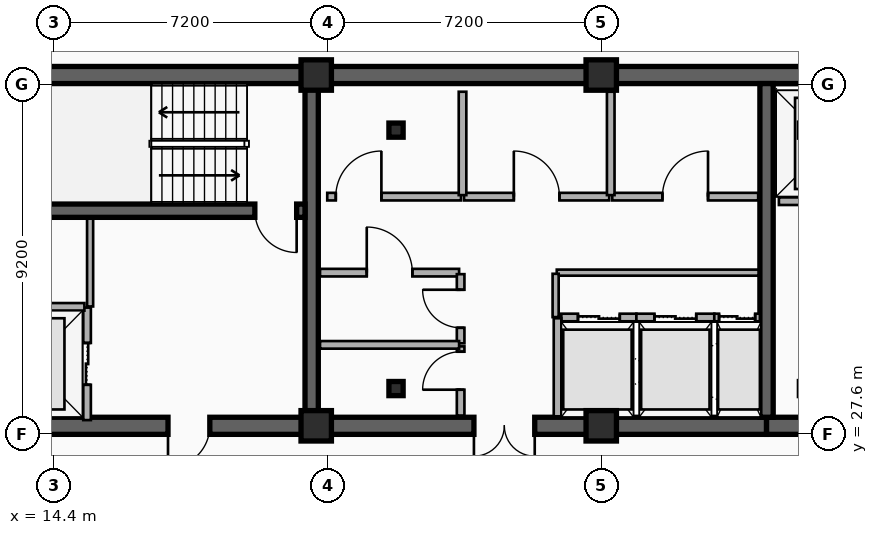
"""IFC4 building model, lengths in metres.
Left out: names, types, materials, properties, quantities, classifications, styles, units other than length and angle.
Written with IfcOpenShell. Run it as: python <this file> out.ifc"""

import sys

from ifc_helpers import new_model, si_unit, direction, frame, frame_2d, origin, origin_2d, place, context, subcontext, project, spatial, rectangle, i_section, extrude, element, fill, save


model = new_model("IFC4")
c1 = context("Model", 3, precision=1e-05, world=origin(), true_north=direction((0.0, 1.0)))
c2 = subcontext(c1, "Body", "Model", "MODEL_VIEW")
j1 = project(units=[si_unit("LENGTHUNIT", "METRE"), si_unit("PLANEANGLEUNIT", "RADIAN")], contexts=[c1])
p1 = place(None, origin())
s1 = spatial("IfcSite", under=j1, at=p1, CompositionType="ELEMENT")
p2 = place(p1, origin())
s2 = spatial("IfcBuilding", under=s1, at=p2, CompositionType="ELEMENT")
p3 = place(p2, frame((0.0, 0.0, 265.8)))
s3 = spatial("IfcBuildingStorey", under=s2, at=p3, CompositionType="ELEMENT", Elevation=265.8)
p4 = place(p3, frame((12.15, 37.05, 0.0), z_axis=(0.0, 0.0, 1.0), x_axis=(1.0, 0.0, 0.0)))
e1 = element("IfcWall", 1, at=p4, inside=s3, PredefinedType="SHEAR", context=c2, shape_type="SweptSolid", body=[
    extrude(rectangle(XDim=33.23, YDim=0.45, at=frame_2d((16.615, 0.0))), origin(), (0.0, 0.0, 1.0), 3.7),
])
p5 = place(p3, frame((21.18, 27.82, 0.0), z_axis=(0.0, 0.0, 1.0), x_axis=(-1.0, 0.0, 0.0)))
e2 = element("IfcWall", 2, at=p5, inside=s3, PredefinedType="SHEAR", context=c2, shape_type="SweptSolid", body=[
    extrude(rectangle(XDim=9.03, YDim=0.45, at=frame_2d((4.515, 0.0))), origin(), (0.0, 0.0, 1.0), 3.7),
])
p6 = place(p5, frame((2.68, 0.0, 0.0)))
e3 = element("IfcOpeningElement", 3, at=p6, cuts=e2, PredefinedType="OPENING", context=c2, shape_type="SweptSolid", body=[
    extrude(rectangle(XDim=1.1, YDim=2.15, at=frame_2d((0.55, 1.075))), frame((0.0, 0.235, 0.0), z_axis=(0.0, -1.0, 0.0), x_axis=(1.0, 0.0, 0.0)), (0.0, 0.0, 1.0), 0.47),
])
p7 = place(p3, frame((33.15, 27.82, 0.0), z_axis=(0.0, 0.0, 1.0), x_axis=(-1.0, 0.0, 0.0)))
e4 = element("IfcWall", 4, at=p7, inside=s3, PredefinedType="SHEAR", context=c2, shape_type="SweptSolid", body=[
    extrude(rectangle(XDim=11.97, YDim=0.45, at=frame_2d((5.985, 0.0))), origin(), (0.0, 0.0, 1.0), 3.7),
])
p8 = place(p7, frame((6.1, 0.0, 0.0)))
e5 = element("IfcOpeningElement", 5, at=p8, cuts=e4, PredefinedType="OPENING", context=c2, shape_type="SweptSolid", body=[
    extrude(rectangle(XDim=1.6, YDim=2.2, at=frame_2d((0.8, 1.1))), frame((0.0, 0.235, 0.0), z_axis=(0.0, -1.0, 0.0), x_axis=(1.0, 0.0, 0.0)), (0.0, 0.0, 1.0), 0.47),
])
p9 = place(p3, frame((45.38, 27.82, 0.0), z_axis=(0.0, 0.0, 1.0), x_axis=(-1.0, 0.0, 0.0)))
e6 = element("IfcWall", 6, at=p9, inside=s3, PredefinedType="SHEAR", context=c2, shape_type="SweptSolid", body=[
    extrude(rectangle(XDim=12.23, YDim=0.45, at=frame_2d((6.115, 0.0))), origin(), (0.0, 0.0, 1.0), 3.7),
])
p10 = place(p9, frame((9.93, 0.0, 0.0)))
e7 = element("IfcOpeningElement", 7, at=p10, cuts=e6, PredefinedType="OPENING", context=c2, shape_type="SweptSolid", body=[
    extrude(rectangle(XDim=1.1, YDim=2.15, at=frame_2d((0.55, 1.075))), frame((0.0, 0.235, 0.0), z_axis=(0.0, -1.0, 0.0), x_axis=(1.0, 0.0, 0.0)), (0.0, 0.0, 1.0), 0.47),
])
p11 = place(p9, frame((6.23, 0.0, 0.0)))
e8 = element("IfcOpeningElement", 8, at=p11, cuts=e6, PredefinedType="OPENING", context=c2, shape_type="SweptSolid", body=[
    extrude(rectangle(XDim=1.1, YDim=2.15, at=frame_2d((0.55, 1.075))), frame((0.0, 0.235, 0.0), z_axis=(0.0, -1.0, 0.0), x_axis=(1.0, 0.0, 0.0)), (0.0, 0.0, 1.0), 0.47),
])
for number, where, z_axis, x_axis in (
    (9, (21.18, 28.045, 0.0), (0.0, 0.0, 1.0), (0.0, 1.0, 0.0)),
    (10, (33.15, 28.045, 0.0), (0.0, 0.0, 1.0), (0.0, 1.0, 0.0)),
):
    element("IfcWall", number, at=place(p3, frame(where, z_axis=z_axis, x_axis=x_axis)), inside=s3, PredefinedType="SHEAR", context=c2, shape_type="SweptSolid", body=[
        extrude(rectangle(XDim=8.78, YDim=0.35, at=frame_2d((4.39, 0.0))), origin(), (0.0, 0.0, 1.0), 3.7),
    ])
p12 = place(p3, frame((21.005, 33.48, 0.0), z_axis=(0.0, 0.0, 1.0), x_axis=(-1.0, 0.0, 0.0)))
e11 = element("IfcWall", 11, at=p12, inside=s3, PredefinedType="SHEAR", context=c2, shape_type="SweptSolid", body=[
    extrude(rectangle(XDim=8.63, YDim=0.35, at=frame_2d((4.315, 0.0))), origin(), (0.0, 0.0, 1.0), 3.7),
])
p13 = place(p12, frame((0.22, 0.0, 0.0)))
e12 = element("IfcOpeningElement", 12, at=p13, cuts=e11, PredefinedType="OPENING", context=c2, shape_type="SweptSolid", body=[
    extrude(rectangle(XDim=1.1, YDim=2.15, at=frame_2d((0.55, 1.075))), frame((0.0, 0.185, 0.0), z_axis=(0.0, -1.0, 0.0), x_axis=(1.0, 0.0, 0.0)), (0.0, 0.0, 1.0), 0.37),
])
for number, where, z_axis, x_axis in (
    (13, (23.4, 28.8, 0.0), (0.0, 0.0, 1.0), (1.0, 0.0, 0.0)),
    (14, (23.4, 35.6, 0.0), (0.0, 0.0, 1.0), (1.0, 0.0, 0.0)),
):
    element("IfcColumn", number, at=place(p3, frame(where, z_axis=z_axis, x_axis=x_axis)), inside=s3, PredefinedType="COLUMN", context=c2, shape_type="SweptSolid", body=[
        extrude(i_section(OverallWidth=0.374, OverallDepth=0.372, WebThickness=0.017, FlangeThickness=0.027, FilletRadius=0.015, at=origin_2d()), origin(), (0.0, 0.0, 1.0), 3.7),
    ])
for number, where, z_axis, x_axis in (
    (15, (21.3, 27.82, 0.0), (0.0, 0.0, 1.0), (1.0, 0.0, 0.0)),
    (16, (21.3, 37.05, 0.0), (0.0, 0.0, 1.0), (1.0, 0.0, 0.0)),
    (17, (28.8, 27.82, 0.0), (0.0, 0.0, 1.0), (1.0, 0.0, 0.0)),
    (18, (28.8, 37.05, 0.0), (0.0, 0.0, 1.0), (1.0, 0.0, 0.0)),
):
    element("IfcColumn", number, at=place(p3, frame(where, z_axis=z_axis, x_axis=x_axis)), inside=s3, PredefinedType="COLUMN", context=c2, shape_type="SweptSolid", body=[
        extrude(rectangle(XDim=0.8, YDim=0.8, at=origin_2d()), origin(), (0.0, 0.0, 1.0), 3.7),
    ])
p14 = place(p3, frame((15.27, 27.97, 0.0), z_axis=(0.0, 0.0, 1.0), x_axis=(0.0, 1.0, 0.0)))
e19 = element("IfcWall", 19, at=p14, inside=s3, PredefinedType="PARTITIONING", context=c2, shape_type="SweptSolid", body=[
    extrude(rectangle(XDim=2.96, YDim=0.2, at=frame_2d((1.48, 0.0))), origin(), (0.0, 0.0, 1.0), 2.49),
])
p15 = place(p14, frame((0.93, 0.0, 0.0)))
e20 = element("IfcOpeningElement", 20, at=p15, cuts=e19, PredefinedType="OPENING", context=c2, shape_type="SweptSolid", body=[
    extrude(rectangle(XDim=1.1, YDim=2.15, at=frame_2d((0.55, 1.075))), frame((0.0, 0.11, 0.0), z_axis=(0.0, -1.0, 0.0), x_axis=(1.0, 0.0, 0.0)), (0.0, 0.0, 1.0), 0.22),
])
p16 = place(p3, frame((12.45, 30.95, 0.0), z_axis=(0.0, 0.0, 1.0), x_axis=(1.0, 0.0, 0.0)))
e21 = element("IfcWall", 21, at=p16, inside=s3, PredefinedType="PARTITIONING", context=c2, shape_type="SweptSolid", body=[
    extrude(rectangle(XDim=2.75, YDim=0.2, at=frame_2d((1.375, 0.0))), origin(), (0.0, 0.0, 1.0), 2.49),
])
p17 = place(p3, frame((33.475, 33.73, 0.0), z_axis=(0.0, 0.0, 1.0), x_axis=(1.0, 0.0, 0.0)))
e22 = element("IfcWall", 22, at=p17, inside=s3, PredefinedType="PARTITIONING", context=c2, shape_type="SweptSolid", body=[
    extrude(rectangle(XDim=2.725, YDim=0.2, at=frame_2d((1.362, 0.0))), origin(), (0.0, 0.0, 1.0), 2.49),
])
p18 = place(p17, frame((0.812, 0.0, 0.0)))
e23 = element("IfcOpeningElement", 23, at=p18, cuts=e22, PredefinedType="OPENING", context=c2, shape_type="SweptSolid", body=[
    extrude(rectangle(XDim=1.1, YDim=2.15, at=frame_2d((0.55, 1.075))), frame((0.0, 0.11, 0.0), z_axis=(0.0, -1.0, 0.0), x_axis=(1.0, 0.0, 0.0)), (0.0, 0.0, 1.0), 0.22),
])
p19 = place(p3, frame((27.75, 30.67, 0.0), z_axis=(0.0, 0.0, 1.0), x_axis=(1.0, 0.0, 0.0)))
e24 = element("IfcWall", 24, at=p19, inside=s3, PredefinedType="PARTITIONING", context=c2, shape_type="SweptSolid", body=[
    extrude(rectangle(XDim=1.975, YDim=0.2, at=frame_2d((0.988, 0.0))), origin(), (0.0, 0.0, 1.0), 2.49),
])
p20 = place(p19, frame((0.438, 0.0, 0.0)))
e25 = element("IfcOpeningElement", 25, at=p20, cuts=e24, PredefinedType="OPENING", context=c2, shape_type="SweptSolid", body=[
    extrude(rectangle(XDim=1.1, YDim=2.15, at=frame_2d((0.55, 1.075))), frame((0.0, 0.11, 0.0), z_axis=(0.0, -1.0, 0.0), x_axis=(1.0, 0.0, 0.0)), (0.0, 0.0, 1.0), 0.22),
])
p21 = place(p3, frame((27.65, 28.07, 0.0), z_axis=(0.0, 0.0, 1.0), x_axis=(0.0, 1.0, 0.0)))
e26 = element("IfcWall", 26, at=p21, inside=s3, PredefinedType="PARTITIONING", context=c2, shape_type="SweptSolid", body=[
    extrude(rectangle(XDim=2.58, YDim=0.2, at=frame_2d((1.29, 0.0))), origin(), (0.0, 0.0, 1.0), 2.49),
])
p22 = place(p3, frame((29.725, 30.67, 0.0), z_axis=(0.0, 0.0, 1.0), x_axis=(1.0, 0.0, 0.0)))
e27 = element("IfcWall", 27, at=p22, inside=s3, PredefinedType="PARTITIONING", context=c2, shape_type="SweptSolid", body=[
    extrude(rectangle(XDim=2.05, YDim=0.2, at=frame_2d((1.025, 0.0))), origin(), (0.0, 0.0, 1.0), 2.8),
])
p23 = place(p22, frame((0.475, 0.0, 0.0)))
e28 = element("IfcOpeningElement", 28, at=p23, cuts=e27, PredefinedType="OPENING", context=c2, shape_type="SweptSolid", body=[
    extrude(rectangle(XDim=1.1, YDim=2.15, at=frame_2d((0.55, 1.075))), frame((0.0, 0.11, 0.0), z_axis=(0.0, -1.0, 0.0), x_axis=(1.0, 0.0, 0.0)), (0.0, 0.0, 1.0), 0.22),
])
p24 = place(p3, frame((31.775, 30.67, 0.0), z_axis=(0.0, 0.0, 1.0), x_axis=(1.0, 0.0, 0.0)))
e29 = element("IfcWall", 29, at=p24, inside=s3, PredefinedType="PARTITIONING", context=c2, shape_type="SweptSolid", body=[
    extrude(rectangle(XDim=1.2, YDim=0.2, at=frame_2d((0.6, 0.0))), origin(), (0.0, 0.0, 1.0), 2.8),
])
p25 = place(p24, frame((0.125, 0.0, 0.0)))
e30 = element("IfcOpeningElement", 30, at=p25, cuts=e29, PredefinedType="OPENING", context=c2, shape_type="SweptSolid", body=[
    extrude(rectangle(XDim=0.95, YDim=2.15, at=frame_2d((0.475, 1.075))), frame((0.0, 0.11, 0.0), z_axis=(0.0, -1.0, 0.0), x_axis=(1.0, 0.0, 0.0)), (0.0, 0.0, 1.0), 0.22),
])
p26 = place(p3, frame((21.4, 31.85, 0.0), z_axis=(0.0, 0.0, 1.0), x_axis=(1.0, 0.0, 0.0)))
e31 = element("IfcWall", 31, at=p26, inside=s3, PredefinedType="PARTITIONING", context=c2, shape_type="SweptSolid", body=[
    extrude(rectangle(XDim=3.66, YDim=0.2, at=frame_2d((1.83, 0.0))), origin(), (0.0, 0.0, 1.0), 2.49),
])
p27 = place(p26, frame((1.23, 0.0, 0.0)))
e32 = element("IfcOpeningElement", 32, at=p27, cuts=e31, PredefinedType="OPENING", context=c2, shape_type="SweptSolid", body=[
    extrude(rectangle(XDim=1.2, YDim=2.15, at=frame_2d((0.6, 1.075))), frame((0.0, 0.11, 0.0), z_axis=(0.0, -1.0, 0.0), x_axis=(1.0, 0.0, 0.0)), (0.0, 0.0, 1.0), 0.22),
])
p28 = place(p3, frame((21.59, 33.85, 0.0), z_axis=(0.0, 0.0, 1.0), x_axis=(1.0, 0.0, 0.0)))
e33 = element("IfcWall", 33, at=p28, inside=s3, PredefinedType="PARTITIONING", context=c2, shape_type="SweptSolid", body=[
    extrude(rectangle(XDim=3.52, YDim=0.2, at=frame_2d((1.76, 0.0))), origin(), (0.0, 0.0, 1.0), 2.49),
])
p29 = place(p28, frame((0.225, 0.0, 0.0)))
e34 = element("IfcOpeningElement", 34, at=p29, cuts=e33, PredefinedType="OPENING", context=c2, shape_type="SweptSolid", body=[
    extrude(rectangle(XDim=1.2, YDim=2.15, at=frame_2d((0.6, 1.075))), frame((0.0, 0.11, 0.0), z_axis=(0.0, -1.0, 0.0), x_axis=(1.0, 0.0, 0.0)), (0.0, 0.0, 1.0), 0.22),
])
p30 = place(p3, frame((25.19, 33.85, 0.0), z_axis=(0.0, 0.0, 1.0), x_axis=(1.0, 0.0, 0.0)))
e35 = element("IfcWall", 35, at=p30, inside=s3, PredefinedType="PARTITIONING", context=c2, shape_type="SweptSolid", body=[
    extrude(rectangle(XDim=3.82, YDim=0.2, at=frame_2d((1.91, 0.0))), origin(), (0.0, 0.0, 1.0), 2.49),
])
p31 = place(p30, frame((1.31, 0.0, 0.0)))
e36 = element("IfcOpeningElement", 36, at=p31, cuts=e35, PredefinedType="OPENING", context=c2, shape_type="SweptSolid", body=[
    extrude(rectangle(XDim=1.2, YDim=2.15, at=frame_2d((0.6, 1.075))), frame((0.0, 0.11, 0.0), z_axis=(0.0, -1.0, 0.0), x_axis=(1.0, 0.0, 0.0)), (0.0, 0.0, 1.0), 0.22),
])
p32 = place(p3, frame((29.09, 33.85, 0.0), z_axis=(0.0, 0.0, 1.0), x_axis=(1.0, 0.0, 0.0)))
e37 = element("IfcWall", 37, at=p32, inside=s3, PredefinedType="PARTITIONING", context=c2, shape_type="SweptSolid", body=[
    extrude(rectangle(XDim=3.84, YDim=0.2, at=frame_2d((1.92, 0.0))), origin(), (0.0, 0.0, 1.0), 2.49),
])
p33 = place(p32, frame((1.32, 0.0, 0.0)))
e38 = element("IfcOpeningElement", 38, at=p33, cuts=e37, PredefinedType="OPENING", context=c2, shape_type="SweptSolid", body=[
    extrude(rectangle(XDim=1.2, YDim=2.15, at=frame_2d((0.6, 1.075))), frame((0.0, 0.11, 0.0), z_axis=(0.0, -1.0, 0.0), x_axis=(1.0, 0.0, 0.0)), (0.0, 0.0, 1.0), 0.22),
])
p34 = place(p3, frame((25.1, 28.09, 0.0), z_axis=(0.0, 0.0, 1.0), x_axis=(0.0, 1.0, 0.0)))
e39 = element("IfcWall", 39, at=p34, inside=s3, PredefinedType="PARTITIONING", context=c2, shape_type="SweptSolid", body=[
    extrude(rectangle(XDim=1.82, YDim=0.2, at=frame_2d((0.91, 0.0))), origin(), (0.0, 0.0, 1.0), 2.8),
])
p35 = place(p34, frame((0.68, 0.0, 0.0)))
e40 = element("IfcOpeningElement", 40, at=p35, cuts=e39, PredefinedType="OPENING", context=c2, shape_type="SweptSolid", body=[
    extrude(rectangle(XDim=1.0, YDim=2.15, at=frame_2d((0.5, 1.075))), frame((0.0, 0.11, 0.0), z_axis=(0.0, -1.0, 0.0), x_axis=(1.0, 0.0, 0.0)), (0.0, 0.0, 1.0), 0.22),
])
p36 = place(p3, frame((25.1, 29.99, 0.0), z_axis=(0.0, 0.0, 1.0), x_axis=(0.0, 1.0, 0.0)))
e41 = element("IfcWall", 41, at=p36, inside=s3, PredefinedType="PARTITIONING", context=c2, shape_type="SweptSolid", body=[
    extrude(rectangle(XDim=1.82, YDim=0.2, at=frame_2d((0.91, 0.0))), origin(), (0.0, 0.0, 1.0), 3.42),
])
p37 = place(p36, frame((0.41, 0.0, 0.0)))
e42 = element("IfcOpeningElement", 42, at=p37, cuts=e41, PredefinedType="OPENING", context=c2, shape_type="SweptSolid", body=[
    extrude(rectangle(XDim=1.0, YDim=2.15, at=frame_2d((0.5, 1.075))), frame((0.0, 0.11, 0.0), z_axis=(0.0, -1.0, 0.0), x_axis=(1.0, 0.0, 0.0)), (0.0, 0.0, 1.0), 0.22),
])
p38 = place(p3, frame((21.4, 29.95, 0.0), z_axis=(0.0, 0.0, 1.0), x_axis=(1.0, 0.0, 0.0)))
e43 = element("IfcWall", 43, at=p38, inside=s3, PredefinedType="PARTITIONING", context=c2, shape_type="SweptSolid", body=[
    extrude(rectangle(XDim=3.66, YDim=0.2, at=frame_2d((1.83, 0.0))), origin(), (0.0, 0.0, 1.0), 2.49),
])
p39 = place(p3, frame((25.15, 33.89, 0.0), z_axis=(0.0, 0.0, 1.0), x_axis=(0.0, 1.0, 0.0)))
e44 = element("IfcWall", 44, at=p39, inside=s3, PredefinedType="PARTITIONING", context=c2, shape_type="SweptSolid", body=[
    extrude(rectangle(XDim=2.72, YDim=0.2, at=frame_2d((1.36, 0.0))), origin(), (0.0, 0.0, 1.0), 3.42),
])
p40 = place(p3, frame((29.05, 33.89, 0.0), z_axis=(0.0, 0.0, 1.0), x_axis=(0.0, 1.0, 0.0)))
e45 = element("IfcWall", 45, at=p40, inside=s3, PredefinedType="PARTITIONING", context=c2, shape_type="SweptSolid", body=[
    extrude(rectangle(XDim=2.72, YDim=0.2, at=frame_2d((1.36, 0.0))), origin(), (0.0, 0.0, 1.0), 2.49),
])
p41 = place(p3, frame((15.35, 30.96, 0.0), z_axis=(0.0, 0.0, 1.0), x_axis=(0.0, 1.0, 0.0)))
e46 = element("IfcWall", 46, at=p41, inside=s3, PredefinedType="PARTITIONING", context=c2, shape_type="SweptSolid", body=[
    extrude(rectangle(XDim=2.31, YDim=0.16, at=frame_2d((1.155, 0.0))), origin(), (0.0, 0.0, 1.0), 3.42),
])
p42 = place(p3, frame((27.63, 31.85, 0.0), z_axis=(0.0, 0.0, 1.0), x_axis=(1.0, 0.0, 0.0)))
e47 = element("IfcWall", 47, at=p42, inside=s3, PredefinedType="PARTITIONING", context=c2, shape_type="SweptSolid", body=[
    extrude(rectangle(XDim=5.31, YDim=0.16, at=frame_2d((2.655, 0.0))), origin(), (0.0, 0.0, 1.0), 2.49),
])
p43 = place(p3, frame((27.6, 30.68, 0.0), z_axis=(0.0, 0.0, 1.0), x_axis=(0.0, 1.0, 0.0)))
e48 = element("IfcWall", 48, at=p43, inside=s3, PredefinedType="PARTITIONING", context=c2, shape_type="SweptSolid", body=[
    extrude(rectangle(XDim=1.14, YDim=0.16, at=frame_2d((0.57, 0.0))), origin(), (0.0, 0.0, 1.0), 3.42),
])
p44 = place(p15, origin())
e49 = element("IfcDoor", 49, at=p44, inside=s3, OperationType="DOUBLE_DOOR_SLIDING", PredefinedType="DOOR", context=c2, shape_type="SweptSolid", body=[
    extrude(rectangle(XDim=1.1, YDim=2.15, at=frame_2d((0.55, 1.075))), frame((0.0, 0.025, 0.0), z_axis=(0.0, -1.0, 0.0), x_axis=(1.0, 0.0, 0.0)), (0.0, 0.0, 1.0), 0.05),
])
fill(e20, e49)
p45 = place(p20, origin())
e50 = element("IfcDoor", 50, at=p45, inside=s3, OperationType="DOUBLE_DOOR_SLIDING", PredefinedType="DOOR", context=c2, shape_type="SweptSolid", body=[
    extrude(rectangle(XDim=1.1, YDim=2.15, at=frame_2d((0.55, 1.075))), frame((0.0, 0.025, 0.0), z_axis=(0.0, -1.0, 0.0), x_axis=(1.0, 0.0, 0.0)), (0.0, 0.0, 1.0), 0.05),
])
fill(e25, e50)
p46 = place(p23, origin())
e51 = element("IfcDoor", 51, at=p46, inside=s3, OperationType="DOUBLE_DOOR_SLIDING", PredefinedType="DOOR", context=c2, shape_type="SweptSolid", body=[
    extrude(rectangle(XDim=1.1, YDim=2.15, at=frame_2d((0.55, 1.075))), frame((0.0, 0.025, 0.0), z_axis=(0.0, -1.0, 0.0), x_axis=(1.0, 0.0, 0.0)), (0.0, 0.0, 1.0), 0.05),
])
fill(e28, e51)
p47 = place(p25, origin())
e52 = element("IfcDoor", 52, at=p47, inside=s3, OperationType="DOUBLE_DOOR_SLIDING", PredefinedType="DOOR", context=c2, shape_type="SweptSolid", body=[
    extrude(rectangle(XDim=0.95, YDim=2.15, at=frame_2d((0.475, 1.075))), frame((0.0, 0.025, 0.0), z_axis=(0.0, -1.0, 0.0), x_axis=(1.0, 0.0, 0.0)), (0.0, 0.0, 1.0), 0.05),
])
fill(e30, e52)
p48 = place(p13, origin())
e53 = element("IfcDoor", 53, at=p48, inside=s3, OperationType="SINGLE_SWING_LEFT", PredefinedType="DOOR", context=c2, shape_type="SweptSolid", body=[
    extrude(rectangle(XDim=1.1, YDim=2.15, at=frame_2d((0.55, 1.075))), frame((0.0, 0.025, 0.0), z_axis=(0.0, -1.0, 0.0), x_axis=(1.0, 0.0, 0.0)), (0.0, 0.0, 1.0), 0.05),
])
fill(e12, e53)
p49 = place(p6, origin())
e54 = element("IfcDoor", 54, at=p49, inside=s3, OperationType="SINGLE_SWING_RIGHT", PredefinedType="DOOR", context=c2, shape_type="SweptSolid", body=[
    extrude(rectangle(XDim=1.1, YDim=2.15, at=frame_2d((0.55, 1.075))), frame((0.0, 0.025, 0.0), z_axis=(0.0, -1.0, 0.0), x_axis=(1.0, 0.0, 0.0)), (0.0, 0.0, 1.0), 0.05),
])
fill(e3, e54)
p50 = place(p8, origin())
e55 = element("IfcDoor", 55, at=p50, inside=s3, OperationType="SINGLE_SWING_LEFT", PredefinedType="DOOR", context=c2, shape_type="SweptSolid", body=[
    extrude(rectangle(XDim=1.6, YDim=2.2, at=frame_2d((0.8, 1.1))), frame((0.0, 0.025, 0.0), z_axis=(0.0, -1.0, 0.0), x_axis=(1.0, 0.0, 0.0)), (0.0, 0.0, 1.0), 0.05),
])
fill(e5, e55)
p51 = place(p27, origin())
e56 = element("IfcDoor", 56, at=p51, inside=s3, OperationType="SINGLE_SWING_LEFT", PredefinedType="DOOR", context=c2, shape_type="SweptSolid", body=[
    extrude(rectangle(XDim=1.2, YDim=2.15, at=frame_2d((0.6, 1.075))), frame((0.0, 0.025, 0.0), z_axis=(0.0, -1.0, 0.0), x_axis=(1.0, 0.0, 0.0)), (0.0, 0.0, 1.0), 0.05),
])
fill(e32, e56)
p52 = place(p29, origin())
e57 = element("IfcDoor", 57, at=p52, inside=s3, OperationType="SINGLE_SWING_RIGHT", PredefinedType="DOOR", context=c2, shape_type="SweptSolid", body=[
    extrude(rectangle(XDim=1.2, YDim=2.15, at=frame_2d((0.6, 1.075))), frame((0.0, 0.025, 0.0), z_axis=(0.0, -1.0, 0.0), x_axis=(1.0, 0.0, 0.0)), (0.0, 0.0, 1.0), 0.05),
])
fill(e34, e57)
p53 = place(p31, origin())
e58 = element("IfcDoor", 58, at=p53, inside=s3, OperationType="SINGLE_SWING_LEFT", PredefinedType="DOOR", context=c2, shape_type="SweptSolid", body=[
    extrude(rectangle(XDim=1.2, YDim=2.15, at=frame_2d((0.6, 1.075))), frame((0.0, 0.025, 0.0), z_axis=(0.0, -1.0, 0.0), x_axis=(1.0, 0.0, 0.0)), (0.0, 0.0, 1.0), 0.05),
])
fill(e36, e58)
p54 = place(p33, origin())
e59 = element("IfcDoor", 59, at=p54, inside=s3, OperationType="SINGLE_SWING_RIGHT", PredefinedType="DOOR", context=c2, shape_type="SweptSolid", body=[
    extrude(rectangle(XDim=1.2, YDim=2.15, at=frame_2d((0.6, 1.075))), frame((0.0, 0.025, 0.0), z_axis=(0.0, -1.0, 0.0), x_axis=(1.0, 0.0, 0.0)), (0.0, 0.0, 1.0), 0.05),
])
fill(e38, e59)
p55 = place(p35, origin())
e60 = element("IfcDoor", 60, at=p55, inside=s3, OperationType="SINGLE_SWING_LEFT", PredefinedType="DOOR", context=c2, shape_type="SweptSolid", body=[
    extrude(rectangle(XDim=1.0, YDim=2.15, at=frame_2d((0.5, 1.075))), frame((0.0, 0.025, 0.0), z_axis=(0.0, -1.0, 0.0), x_axis=(1.0, 0.0, 0.0)), (0.0, 0.0, 1.0), 0.05),
])
fill(e40, e60)
p56 = place(p37, origin())
e61 = element("IfcDoor", 61, at=p56, inside=s3, OperationType="SINGLE_SWING_RIGHT", PredefinedType="DOOR", context=c2, shape_type="SweptSolid", body=[
    extrude(rectangle(XDim=1.0, YDim=2.15, at=frame_2d((0.5, 1.075))), frame((0.0, 0.025, 0.0), z_axis=(0.0, -1.0, 0.0), x_axis=(1.0, 0.0, 0.0)), (0.0, 0.0, 1.0), 0.05),
])
fill(e42, e61)
save(model, sys.argv[1])
